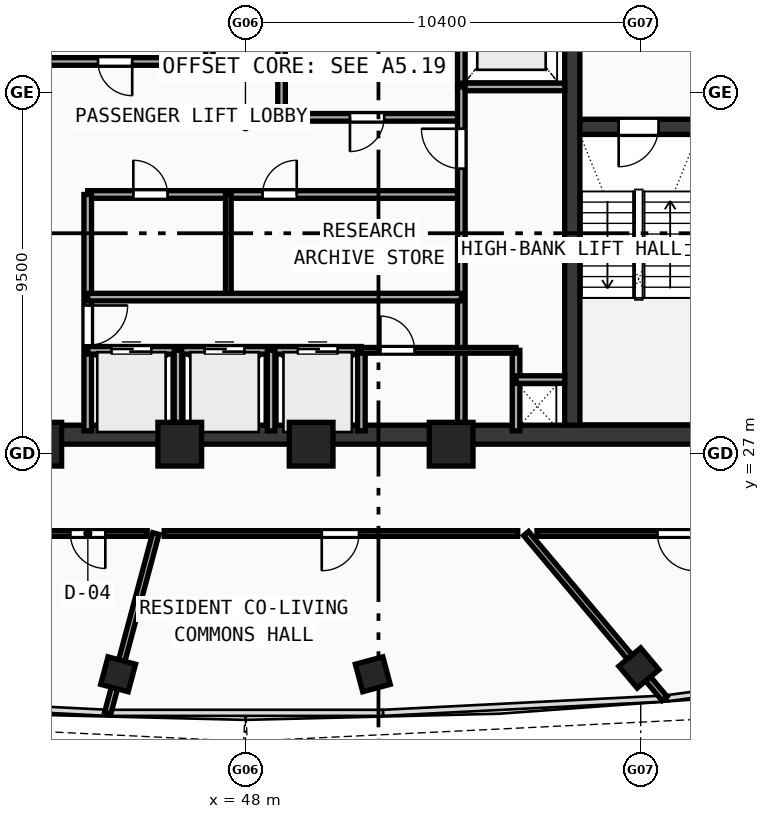
"""IFC4 building model, lengths in metres.
Left out: names, types, materials, properties, quantities, classifications, styles, units other than length and angle.
Written with IfcOpenShell. Run it as: python <this file> out.ifc"""

import sys

from ifc_helpers import new_model, si_unit, direction, frame, frame_2d, origin, origin_with_axes, origin_2d, place, context, subcontext, project, spatial, rectangle, hollow_rectangle, extrude, source, transform, mapped, element, fill, save


model = new_model("IFC4")
c1 = context("Model", 3, precision=1e-05, world=origin(), true_north=direction((0.0, 1.0)))
c2 = subcontext(c1, "Body", "Model", "MODEL_VIEW")
j1 = project(units=[si_unit("LENGTHUNIT", "METRE"), si_unit("PLANEANGLEUNIT", "RADIAN")], contexts=[c1])
p1 = place(None, origin())
s1 = spatial("IfcSite", under=j1, at=p1, CompositionType="ELEMENT")
p2 = place(p1, origin())
s2 = spatial("IfcBuilding", under=s1, at=p2, CompositionType="ELEMENT")
p3 = place(p2, frame((0.0, 0.0, 311.13)))
s3 = spatial("IfcBuildingStorey", under=s2, at=p3, CompositionType="ELEMENT", Elevation=311.13)
p4 = place(p3, frame((35.55, 27.5, 0.0), z_axis=(0.0, 0.0, 1.0), x_axis=(1.0, 0.0, 0.0)))
e1 = element("IfcWall", 1, at=p4, inside=s3, PredefinedType="SHEAR", context=c2, shape_type="SweptSolid", body=[
    extrude(rectangle(XDim=24.9, YDim=0.5, at=frame_2d((12.45, 0.0))), origin(), (0.0, 0.0, 1.0), 3.47),
])
p5 = place(p3, frame((56.6, 27.75, 0.0), z_axis=(0.0, 0.0, 1.0), x_axis=(0.0, 1.0, 0.0)))
e2 = element("IfcWall", 2, at=p5, inside=s3, PredefinedType="SHEAR", context=c2, shape_type="SweptSolid", body=[
    extrude(rectangle(XDim=12.2, YDim=0.4, at=frame_2d((6.1, 0.0))), origin(), (0.0, 0.0, 1.0), 3.47),
])
p6 = place(p5, frame((10.0, 0.0, 0.0)))
e3 = element("IfcOpeningElement", 3, at=p6, cuts=e2, PredefinedType="OPENING", context=c2, shape_type="SweptSolid", body=[
    extrude(rectangle(XDim=1.1, YDim=2.1, at=frame_2d((0.55, 1.05))), frame((0.0, 0.21, 0.0), z_axis=(0.0, -1.0, 0.0), x_axis=(1.0, 0.0, 0.0)), (0.0, 0.0, 1.0), 0.42),
])
p7 = place(p3, frame((56.8, 35.6, 0.0), z_axis=(0.0, 0.0, 1.0), x_axis=(1.0, 0.0, 0.0)))
e4 = element("IfcWall", 4, at=p7, inside=s3, PredefinedType="SHEAR", context=c2, shape_type="SweptSolid", body=[
    extrude(rectangle(XDim=3.15, YDim=0.4, at=frame_2d((1.575, 0.0))), origin(), (0.0, 0.0, 1.0), 3.47),
])
p8 = place(p7, frame((1.02, 0.0, 0.0)))
e5 = element("IfcOpeningElement", 5, at=p8, cuts=e4, PredefinedType="OPENING", context=c2, shape_type="SweptSolid", body=[
    extrude(rectangle(XDim=1.05, YDim=2.1, at=frame_2d((0.525, 1.05))), frame((0.0, 0.21, 0.0), z_axis=(0.0, -1.0, 0.0), x_axis=(1.0, 0.0, 0.0)), (0.0, 0.0, 1.0), 0.42),
])
m1 = source(origin(), c2, "Body", "SweptSolid", [
    extrude(hollow_rectangle(XDim=1.15, YDim=1.15, WallThickness=0.048, at=origin_2d()), origin(), (0.0, 0.0, 1.0), 3.73),
])
for number, where, z_axis, x_axis in (
    (6, (42.588, 27.25, -0.26), (0.0, 0.0, 1.0), (1.0, 0.0, 0.0)),
    (7, (46.272, 27.25, -0.26), (0.0, 0.0, 1.0), (1.0, 0.0, 0.0)),
    (8, (49.729, 27.25, -0.26), (0.0, 0.0, 1.0), (1.0, 0.0, 0.0)),
    (9, (53.412, 27.25, -0.26), (0.0, 0.0, 1.0), (1.0, 0.0, 0.0)),
):
    element("IfcColumn", number, at=place(p3, frame(where, z_axis=z_axis, x_axis=x_axis)), inside=s3, PredefinedType="COLUMN", context=c2, shape_type="MappedRepresentation", body=[
        mapped(m1, transform((0.0, 0.0, 0.0), scale=1.0)),
    ])
m2 = source(origin(), c2, "Body", "SweptSolid", [
    extrude(hollow_rectangle(XDim=0.75, YDim=0.75, WallThickness=0.028, at=origin_2d()), origin(), (0.0, 0.0, 1.0), 3.73),
])
for number, where, z_axis, x_axis in (
    (10, (44.649, 21.196, -0.26), (0.0, 0.0, 1.0), (0.966, -0.259, 0.0)),
    (11, (51.351, 21.196, -0.26), (0.0, 0.0, 1.0), (0.966, 0.259, 0.0)),
    (12, (58.354, 21.362, -0.26), (0.0, 0.0, 1.0), (0.766, 0.643, 0.0)),
):
    element("IfcColumn", number, at=place(p3, frame(where, z_axis=z_axis, x_axis=x_axis)), inside=s3, PredefinedType="COLUMN", context=c2, shape_type="MappedRepresentation", body=[
        mapped(m2, transform((0.0, 0.0, 0.0), scale=1.0)),
    ])
p9 = place(p3, frame((53.68, 36.65, 0.0), z_axis=(0.0, 0.0, 1.0), x_axis=(0.0, 1.0, 0.0)))
e13 = element("IfcWall", 13, at=p9, inside=s3, PredefinedType="SOLIDWALL", context=c2, shape_type="SweptSolid", body=[
    extrude(rectangle(XDim=3.3, YDim=0.2, at=frame_2d((1.65, 0.0))), origin(), (0.0, 0.0, 1.0), 3.47),
])
p10 = place(p3, frame((53.68, 36.65, 0.0), z_axis=(0.0, 0.0, 1.0), x_axis=(1.0, 0.0, 0.0)))
e14 = element("IfcWall", 14, at=p10, inside=s3, PredefinedType="SOLIDWALL", context=c2, shape_type="SweptSolid", body=[
    extrude(rectangle(XDim=2.72, YDim=0.2, at=frame_2d((1.36, 0.0))), origin(), (0.0, 0.0, 1.0), 3.47),
])
p11 = place(p3, frame((42.32, 37.32, 0.0), z_axis=(0.0, 0.0, 1.0), x_axis=(1.0, 0.0, 0.0)))
e15 = element("IfcWall", 15, at=p11, inside=s3, PredefinedType="SOLIDWALL", context=c2, shape_type="SweptSolid", body=[
    extrude(rectangle(XDim=4.73, YDim=0.2, at=frame_2d((2.365, 0.0))), origin(), (0.0, 0.0, 1.0), 3.47),
])
p12 = place(p11, frame((1.8, 0.0, 0.0)))
e16 = element("IfcOpeningElement", 16, at=p12, cuts=e15, PredefinedType="OPENING", context=c2, shape_type="SweptSolid", body=[
    extrude(rectangle(XDim=0.9, YDim=2.1, at=frame_2d((0.45, 1.05))), frame((0.0, 0.11, 0.0), z_axis=(0.0, -1.0, 0.0), x_axis=(1.0, 0.0, 0.0)), (0.0, 0.0, 1.0), 0.22),
])
p13 = place(p3, frame((48.95, 35.85, 0.0), z_axis=(0.0, 0.0, 1.0), x_axis=(1.0, 0.0, 0.0)))
e17 = element("IfcWall", 17, at=p13, inside=s3, PredefinedType="SOLIDWALL", context=c2, shape_type="SweptSolid", body=[
    extrude(rectangle(XDim=4.73, YDim=0.2, at=frame_2d((2.365, 0.0))), origin(), (0.0, 0.0, 1.0), 3.47),
])
p14 = place(p13, frame((1.8, 0.0, 0.0)))
e18 = element("IfcOpeningElement", 18, at=p14, cuts=e17, PredefinedType="OPENING", context=c2, shape_type="SweptSolid", body=[
    extrude(rectangle(XDim=0.9, YDim=2.1, at=frame_2d((0.45, 1.05))), frame((0.0, 0.11, 0.0), z_axis=(0.0, -1.0, 0.0), x_axis=(1.0, 0.0, 0.0)), (0.0, 0.0, 1.0), 0.22),
])
p15 = place(p3, frame((47.05, 37.32, 0.0), z_axis=(0.0, 0.0, 1.0), x_axis=(0.0, 1.0, 0.0)))
e19 = element("IfcWall", 19, at=p15, inside=s3, PredefinedType="SOLIDWALL", context=c2, shape_type="SweptSolid", body=[
    extrude(rectangle(XDim=2.63, YDim=0.2, at=frame_2d((1.315, 0.0))), origin(), (0.0, 0.0, 1.0), 3.47),
])
p16 = place(p3, frame((48.95, 35.85, 0.0), z_axis=(0.0, 0.0, 1.0), x_axis=(0.0, 1.0, 0.0)))
e20 = element("IfcWall", 20, at=p16, inside=s3, PredefinedType="SOLIDWALL", context=c2, shape_type="SweptSolid", body=[
    extrude(rectangle(XDim=4.1, YDim=0.2, at=frame_2d((2.05, 0.0))), origin(), (0.0, 0.0, 1.0), 3.47),
])
p17 = place(p3, frame((43.85, 33.82, 0.0), z_axis=(0.0, 0.0, 1.0), x_axis=(1.0, 0.0, 0.0)))
e21 = element("IfcWall", 21, at=p17, inside=s3, PredefinedType="SOLIDWALL", context=c2, shape_type="SweptSolid", body=[
    extrude(rectangle(XDim=9.83, YDim=0.2, at=frame_2d((4.915, 0.0))), origin(), (0.0, 0.0, 1.0), 3.47),
])
p18 = place(p17, frame((1.2, 0.0, 0.0)))
e22 = element("IfcOpeningElement", 22, at=p18, cuts=e21, PredefinedType="OPENING", context=c2, shape_type="SweptSolid", body=[
    extrude(rectangle(XDim=0.9, YDim=2.1, at=frame_2d((0.45, 1.05))), frame((0.0, 0.11, 0.0), z_axis=(0.0, -1.0, 0.0), x_axis=(1.0, 0.0, 0.0)), (0.0, 0.0, 1.0), 0.22),
])
p19 = place(p17, frame((4.6, 0.0, 0.0)))
e23 = element("IfcOpeningElement", 23, at=p19, cuts=e21, PredefinedType="OPENING", context=c2, shape_type="SweptSolid", body=[
    extrude(rectangle(XDim=0.9, YDim=2.1, at=frame_2d((0.45, 1.05))), frame((0.0, 0.11, 0.0), z_axis=(0.0, -1.0, 0.0), x_axis=(1.0, 0.0, 0.0)), (0.0, 0.0, 1.0), 0.22),
])
p20 = place(p3, frame((43.85, 27.6, 0.0), z_axis=(0.0, 0.0, 1.0), x_axis=(0.0, 1.0, 0.0)))
e24 = element("IfcWall", 24, at=p20, inside=s3, PredefinedType="SOLIDWALL", context=c2, shape_type="SweptSolid", body=[
    extrude(rectangle(XDim=6.22, YDim=0.2, at=frame_2d((3.11, 0.0))), origin(), (0.0, 0.0, 1.0), 3.47),
])
p21 = place(p20, frame((2.25, 0.0, 0.0)))
e25 = element("IfcOpeningElement", 25, at=p21, cuts=e24, PredefinedType="OPENING", context=c2, shape_type="SweptSolid", body=[
    extrude(rectangle(XDim=1.05, YDim=2.1, at=frame_2d((0.525, 1.05))), frame((0.0, 0.11, 0.0), z_axis=(0.0, -1.0, 0.0), x_axis=(1.0, 0.0, 0.0)), (0.0, 0.0, 1.0), 0.22),
])
p22 = place(p3, frame((53.68, 27.6, 0.0), z_axis=(0.0, 0.0, 1.0), x_axis=(0.0, 1.0, 0.0)))
e26 = element("IfcWall", 26, at=p22, inside=s3, PredefinedType="SOLIDWALL", context=c2, shape_type="SweptSolid", body=[
    extrude(rectangle(XDim=9.05, YDim=0.2, at=frame_2d((4.525, 0.0))), origin(), (0.0, 0.0, 1.0), 3.47),
])
p23 = place(p22, frame((6.9, 0.0, 0.0)))
e27 = element("IfcOpeningElement", 27, at=p23, cuts=e26, PredefinedType="OPENING", context=c2, shape_type="SweptSolid", body=[
    extrude(rectangle(XDim=1.05, YDim=2.1, at=frame_2d((0.525, 1.05))), frame((0.0, 0.11, 0.0), z_axis=(0.0, -1.0, 0.0), x_axis=(1.0, 0.0, 0.0)), (0.0, 0.0, 1.0), 0.22),
])
p24 = place(p3, frame((47.55, 31.12, 0.0), z_axis=(0.0, 0.0, 1.0), x_axis=(0.0, 1.0, 0.0)))
e28 = element("IfcWall", 28, at=p24, inside=s3, PredefinedType="PARTITIONING", context=c2, shape_type="SweptSolid", body=[
    extrude(rectangle(XDim=2.7, YDim=0.15, at=frame_2d((1.35, 0.0))), origin(), (0.0, 0.0, 1.0), 3.47),
])
p25 = place(p3, frame((43.85, 29.72, 0.0), z_axis=(0.0, 0.0, 1.0), x_axis=(1.0, 0.0, 0.0)))
e29 = element("IfcWall", 29, at=p25, inside=s3, PredefinedType="SOLIDWALL", context=c2, shape_type="SweptSolid", body=[
    extrude(rectangle(XDim=7.2, YDim=0.2, at=frame_2d((3.6, 0.0))), origin(), (0.0, 0.0, 1.0), 3.47),
])
p26 = place(p25, frame((0.625, 0.0, 0.0)))
e30 = element("IfcOpeningElement", 30, at=p26, cuts=e29, PredefinedType="OPENING", context=c2, shape_type="SweptSolid", body=[
    extrude(rectangle(XDim=1.05, YDim=2.1, at=frame_2d((0.525, 1.05))), frame((0.0, 0.11, 0.0), z_axis=(0.0, -1.0, 0.0), x_axis=(1.0, 0.0, 0.0)), (0.0, 0.0, 1.0), 0.22),
])
p27 = place(p25, frame((3.075, 0.0, 0.0)))
e31 = element("IfcOpeningElement", 31, at=p27, cuts=e29, PredefinedType="OPENING", context=c2, shape_type="SweptSolid", body=[
    extrude(rectangle(XDim=1.05, YDim=2.1, at=frame_2d((0.525, 1.05))), frame((0.0, 0.11, 0.0), z_axis=(0.0, -1.0, 0.0), x_axis=(1.0, 0.0, 0.0)), (0.0, 0.0, 1.0), 0.22),
])
p28 = place(p25, frame((5.525, 0.0, 0.0)))
e32 = element("IfcOpeningElement", 32, at=p28, cuts=e29, PredefinedType="OPENING", context=c2, shape_type="SweptSolid", body=[
    extrude(rectangle(XDim=1.05, YDim=2.1, at=frame_2d((0.525, 1.05))), frame((0.0, 0.11, 0.0), z_axis=(0.0, -1.0, 0.0), x_axis=(1.0, 0.0, 0.0)), (0.0, 0.0, 1.0), 0.22),
])
p29 = place(p3, frame((51.05, 27.6, 0.0), z_axis=(0.0, 0.0, 1.0), x_axis=(0.0, 1.0, 0.0)))
e33 = element("IfcWall", 33, at=p29, inside=s3, PredefinedType="SOLIDWALL", context=c2, shape_type="SweptSolid", body=[
    extrude(rectangle(XDim=2.12, YDim=0.2, at=frame_2d((1.06, 0.0))), origin(), (0.0, 0.0, 1.0), 3.47),
])
p30 = place(p3, frame((43.85, 31.12, 0.0), z_axis=(0.0, 0.0, 1.0), x_axis=(1.0, 0.0, 0.0)))
e34 = element("IfcWall", 34, at=p30, inside=s3, PredefinedType="SOLIDWALL", context=c2, shape_type="SweptSolid", body=[
    extrude(rectangle(XDim=9.83, YDim=0.2, at=frame_2d((4.915, 0.0))), origin(), (0.0, 0.0, 1.0), 3.47),
])
for number, where, z_axis, x_axis in (
    (35, (46.225, 27.6, 0.0), (0.0, 0.0, 1.0), (0.0, 1.0, 0.0)),
    (36, (48.675, 27.6, 0.0), (0.0, 0.0, 1.0), (0.0, 1.0, 0.0)),
    (37, (55.12, 27.6, 0.0), (0.0, 0.0, 1.0), (0.0, 1.0, 0.0)),
):
    element("IfcWall", number, at=place(p3, frame(where, z_axis=z_axis, x_axis=x_axis)), inside=s3, PredefinedType="SOLIDWALL", context=c2, shape_type="SweptSolid", body=[
        extrude(rectangle(XDim=2.12, YDim=0.2, at=frame_2d((1.06, 0.0))), origin(), (0.0, 0.0, 1.0), 3.47),
    ])
p31 = place(p3, frame((55.12, 28.95, 0.0), z_axis=(0.0, 0.0, 1.0), x_axis=(1.0, 0.0, 0.0)))
e38 = element("IfcWall", 38, at=p31, inside=s3, PredefinedType="SOLIDWALL", context=c2, shape_type="SweptSolid", body=[
    extrude(rectangle(XDim=1.28, YDim=0.2, at=frame_2d((0.64, 0.0))), origin(), (0.0, 0.0, 1.0), 3.47),
])
p32 = place(p3, frame((51.05, 29.72, 0.0), z_axis=(0.0, 0.0, 1.0), x_axis=(1.0, 0.0, 0.0)))
e39 = element("IfcWall", 39, at=p32, inside=s3, PredefinedType="PARTITIONING", context=c2, shape_type="SweptSolid", body=[
    extrude(rectangle(XDim=4.07, YDim=0.15, at=frame_2d((2.035, 0.0))), origin(), (0.0, 0.0, 1.0), 3.47),
])
p33 = place(p32, frame((0.5, 0.0, 0.0)))
e40 = element("IfcOpeningElement", 40, at=p33, cuts=e39, PredefinedType="OPENING", context=c2, shape_type="SweptSolid", body=[
    extrude(rectangle(XDim=0.9, YDim=2.1, at=frame_2d((0.45, 1.05))), frame((0.0, 0.085, 0.0), z_axis=(0.0, -1.0, 0.0), x_axis=(1.0, 0.0, 0.0)), (0.0, 0.0, 1.0), 0.17),
])
p34 = place(p3, frame((45.642, 24.9, 0.0), z_axis=(0.0, 0.0, 1.0), x_axis=(-0.258835177065, -0.965921503598, 0.0)))
e41 = element("IfcWall", 41, at=p34, inside=s3, PredefinedType="PARTITIONING", context=c2, shape_type="SweptSolid", body=[
    extrude(rectangle(XDim=4.885, YDim=0.17, at=frame_2d((2.442, 0.0))), origin(), (0.0, 0.0, 1.0), 2.87),
])
p35 = place(p3, frame((55.384, 24.9, 0.0), z_axis=(0.0, 0.0, 1.0), x_axis=(0.642790029712, -0.76604241247, 0.0)))
e42 = element("IfcWall", 42, at=p35, inside=s3, PredefinedType="PARTITIONING", context=c2, shape_type="SweptSolid", body=[
    extrude(rectangle(XDim=5.669, YDim=0.17, at=frame_2d((2.834, 0.0))), origin(), (0.0, 0.0, 1.0), 2.87),
])
p36 = place(p3, frame((62.85, 24.9, 0.0), z_axis=(0.0, 0.0, 1.0), x_axis=(-1.0, 0.0, 0.0)))
e43 = element("IfcWall", 43, at=p36, inside=s3, PredefinedType="PARTITIONING", context=c2, shape_type="SweptSolid", body=[
    extrude(rectangle(XDim=7.179, YDim=0.15, at=frame_2d((3.589, 0.0))), origin(), (0.0, 0.0, 1.0), 3.12),
])
p37 = place(p36, frame((3.028, 0.0, 0.0)))
e44 = element("IfcOpeningElement", 44, at=p37, cuts=e43, PredefinedType="OPENING", context=c2, shape_type="SweptSolid", body=[
    extrude(rectangle(XDim=0.98, YDim=2.12, at=frame_2d((0.49, 1.06))), frame((0.0, 0.085, 0.0), z_axis=(0.0, -1.0, 0.0), x_axis=(1.0, 0.0, 0.0)), (0.0, 0.0, 1.0), 0.17),
])
p38 = place(p3, frame((55.164, 24.9, 0.0), z_axis=(0.0, 0.0, 1.0), x_axis=(-1.0, 0.0, 0.0)))
e45 = element("IfcWall", 45, at=p38, inside=s3, PredefinedType="PARTITIONING", context=c2, shape_type="SweptSolid", body=[
    extrude(rectangle(XDim=9.302, YDim=0.15, at=frame_2d((4.651, 0.0))), origin(), (0.0, 0.0, 1.0), 2.87),
])
p39 = place(p38, frame((4.176, 0.0, 0.0)))
e46 = element("IfcOpeningElement", 46, at=p39, cuts=e45, PredefinedType="OPENING", context=c2, shape_type="SweptSolid", body=[
    extrude(rectangle(XDim=0.98, YDim=2.12, at=frame_2d((0.49, 1.06))), frame((0.0, 0.085, 0.0), z_axis=(0.0, -1.0, 0.0), x_axis=(1.0, 0.0, 0.0)), (0.0, 0.0, 1.0), 0.17),
])
p40 = place(p3, frame((45.414, 24.9, 0.0), z_axis=(0.0, 0.0, 1.0), x_axis=(-1.0, 0.0, 0.0)))
e47 = element("IfcWall", 47, at=p40, inside=s3, PredefinedType="PARTITIONING", context=c2, shape_type="SweptSolid", body=[
    extrude(rectangle(XDim=3.13, YDim=0.15, at=frame_2d((1.565, 0.0))), origin(), (0.0, 0.0, 1.0), 3.47),
])
p41 = place(p40, frame((1.101, 0.0, 0.0)))
e48 = element("IfcOpeningElement", 48, at=p41, cuts=e47, PredefinedType="OPENING", context=c2, shape_type="SweptSolid", body=[
    extrude(rectangle(XDim=0.92, YDim=2.1, at=frame_2d((0.46, 1.05))), frame((0.0, 0.085, 0.0), z_axis=(0.0, -1.0, 0.0), x_axis=(1.0, 0.0, 0.0)), (0.0, 0.0, 1.0), 0.17),
])
m3 = source(origin(), c2, "Body", "SweptSolid", [
    extrude(rectangle(XDim=1.05, YDim=2.1, at=frame_2d((0.525, 1.05))), frame((0.0, 0.025, 0.0), z_axis=(0.0, -1.0, 0.0), x_axis=(1.0, 0.0, 0.0)), (0.0, 0.0, 1.0), 0.05),
])
p42 = place(p8, frame((1.05, 0.0, 0.0), z_axis=(0.0, 0.0, 1.0), x_axis=(-1.0, 0.0, 0.0)))
e49 = element("IfcDoor", 49, at=p42, inside=s3, OperationType="SINGLE_SWING_RIGHT", PredefinedType="DOOR", context=c2, shape_type="MappedRepresentation", body=[
    mapped(m3, transform((0.0, 0.0, 0.0), scale=1.0)),
])
fill(e5, e49)
m4 = source(origin(), c2, "Body", "SweptSolid", [
    extrude(rectangle(XDim=0.9, YDim=2.1, at=frame_2d((0.45, 1.05))), frame((0.0, 0.025, 0.0), z_axis=(0.0, -1.0, 0.0), x_axis=(1.0, 0.0, 0.0)), (0.0, 0.0, 1.0), 0.05),
])
p43 = place(p12, frame((0.9, 0.0, 0.0), z_axis=(0.0, 0.0, 1.0), x_axis=(-1.0, 0.0, 0.0)))
e50 = element("IfcDoor", 50, at=p43, inside=s3, OperationType="SINGLE_SWING_LEFT", PredefinedType="DOOR", context=c2, shape_type="MappedRepresentation", body=[
    mapped(m4, transform((0.0, 0.0, 0.0), scale=1.0)),
])
fill(e16, e50)
p44 = place(p14, frame((0.9, 0.0, 0.0), z_axis=(0.0, 0.0, 1.0), x_axis=(-1.0, 0.0, 0.0)))
e51 = element("IfcDoor", 51, at=p44, inside=s3, OperationType="SINGLE_SWING_RIGHT", PredefinedType="DOOR", context=c2, shape_type="MappedRepresentation", body=[
    mapped(m4, transform((0.0, 0.0, 0.0), scale=1.0)),
])
fill(e18, e51)
p45 = place(p18, origin_with_axes())
e52 = element("IfcDoor", 52, at=p45, inside=s3, OperationType="SINGLE_SWING_LEFT", PredefinedType="DOOR", context=c2, shape_type="MappedRepresentation", body=[
    mapped(m4, transform((0.0, 0.0, 0.0), scale=1.0)),
])
fill(e22, e52)
p46 = place(p19, origin_with_axes())
e53 = element("IfcDoor", 53, at=p46, inside=s3, OperationType="SINGLE_SWING_RIGHT", PredefinedType="DOOR", context=c2, shape_type="MappedRepresentation", body=[
    mapped(m4, transform((0.0, 0.0, 0.0), scale=1.0)),
])
fill(e23, e53)
p47 = place(p21, frame((1.05, 0.0, 0.0), z_axis=(0.0, 0.0, 1.0), x_axis=(-1.0, 0.0, 0.0)))
e54 = element("IfcDoor", 54, at=p47, inside=s3, OperationType="SINGLE_SWING_LEFT", PredefinedType="DOOR", context=c2, shape_type="MappedRepresentation", body=[
    mapped(m3, transform((0.0, 0.0, 0.0), scale=1.0)),
])
fill(e25, e54)
p48 = place(p23, origin_with_axes())
e55 = element("IfcDoor", 55, at=p48, inside=s3, OperationType="SINGLE_SWING_RIGHT", PredefinedType="DOOR", context=c2, shape_type="MappedRepresentation", body=[
    mapped(m3, transform((0.0, 0.0, 0.0), scale=1.0)),
])
fill(e27, e55)
p49 = place(p26, origin_with_axes())
e56 = element("IfcDoor", 56, at=p49, inside=s3, OperationType="DOUBLE_DOOR_SLIDING", PredefinedType="DOOR", context=c2, shape_type="MappedRepresentation", body=[
    mapped(m3, transform((0.0, 0.0, 0.0), scale=1.0)),
])
fill(e30, e56)
p50 = place(p27, origin_with_axes())
e57 = element("IfcDoor", 57, at=p50, inside=s3, OperationType="DOUBLE_DOOR_SLIDING", PredefinedType="DOOR", context=c2, shape_type="MappedRepresentation", body=[
    mapped(m3, transform((0.0, 0.0, 0.0), scale=1.0)),
])
fill(e31, e57)
p51 = place(p28, origin_with_axes())
e58 = element("IfcDoor", 58, at=p51, inside=s3, OperationType="DOUBLE_DOOR_SLIDING", PredefinedType="DOOR", context=c2, shape_type="MappedRepresentation", body=[
    mapped(m3, transform((0.0, 0.0, 0.0), scale=1.0)),
])
fill(e32, e58)
p52 = place(p33, origin_with_axes())
e59 = element("IfcDoor", 59, at=p52, inside=s3, OperationType="SINGLE_SWING_LEFT", PredefinedType="DOOR", context=c2, shape_type="MappedRepresentation", body=[
    mapped(m4, transform((0.0, 0.0, 0.0), scale=1.0)),
])
fill(e40, e59)
m5 = source(origin(), c2, "Body", "SweptSolid", [
    extrude(rectangle(XDim=0.92, YDim=2.1, at=frame_2d((0.46, 1.05))), frame((0.0, 0.025, 0.0), z_axis=(0.0, -1.0, 0.0), x_axis=(1.0, 0.0, 0.0)), (0.0, 0.0, 1.0), 0.05),
])
p53 = place(p41, origin_with_axes())
e60 = element("IfcDoor", 60, at=p53, inside=s3, OperationType="SINGLE_SWING_LEFT", PredefinedType="DOOR", context=c2, shape_type="MappedRepresentation", body=[
    mapped(m5, transform((0.0, 0.0, 0.0), scale=1.0)),
])
fill(e48, e60)
m6 = source(origin(), c2, "Body", "SweptSolid", [
    extrude(rectangle(XDim=0.98, YDim=2.12, at=frame_2d((0.49, 1.06))), frame((0.0, 0.025, 0.0), z_axis=(0.0, -1.0, 0.0), x_axis=(1.0, 0.0, 0.0)), (0.0, 0.0, 1.0), 0.05),
])
p54 = place(p39, origin_with_axes())
e61 = element("IfcDoor", 61, at=p54, inside=s3, OperationType="SINGLE_SWING_RIGHT", PredefinedType="DOOR", context=c2, shape_type="MappedRepresentation", body=[
    mapped(m6, transform((0.0, 0.0, 0.0), scale=1.0)),
])
fill(e46, e61)
p55 = place(p37, origin_with_axes())
e62 = element("IfcDoor", 62, at=p55, inside=s3, OperationType="SINGLE_SWING_LEFT", PredefinedType="DOOR", context=c2, shape_type="MappedRepresentation", body=[
    mapped(m6, transform((0.0, 0.0, 0.0), scale=1.0)),
])
fill(e44, e62)
save(model, sys.argv[1])
